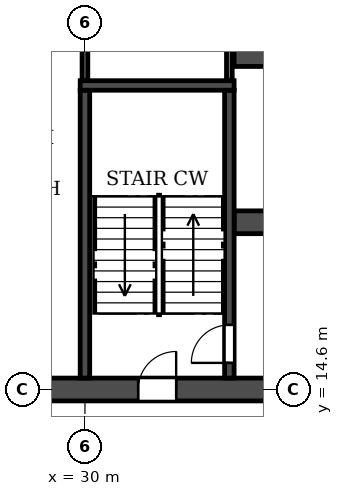
"""IFC4 building model, lengths in metres.
Left out: names, types, materials, properties, quantities, classifications, styles, units other than length and angle.
Written with IfcOpenShell. Run it as: python <this file> out.ifc"""

import sys

from ifc_helpers import new_model, si_unit, direction, frame, frame_2d, origin, place, context, subcontext, project, spatial, rectangle, extrude, element, fill, save


model = new_model("IFC4")
c1 = context("Model", 3, precision=1e-05, world=origin(), true_north=direction((0.0, 1.0)))
c2 = subcontext(c1, "Body", "Model", "MODEL_VIEW")
j1 = project(units=[si_unit("LENGTHUNIT", "METRE"), si_unit("PLANEANGLEUNIT", "RADIAN")], contexts=[c1])
p1 = place(None, origin())
s1 = spatial("IfcSite", under=j1, at=p1, CompositionType="ELEMENT")
p2 = place(p1, origin())
s2 = spatial("IfcBuilding", under=s1, at=p2, CompositionType="ELEMENT")
p3 = place(p2, frame((0.0, 0.0, 63.0)))
s3 = spatial("IfcBuildingStorey", under=s2, at=p3, CompositionType="ELEMENT", Elevation=63.0)
p4 = place(p3, frame((8.6, 14.6, 0.0), z_axis=(0.0, 0.0, 1.0), x_axis=(1.0, 0.0, 0.0)))
e1 = element("IfcWall", 1, at=p4, inside=s3, PredefinedType="SOLIDWALL", context=c2, shape_type="SweptSolid", body=[
    extrude(rectangle(XDim=84.8, YDim=0.6, at=frame_2d((42.4, 0.0))), origin(), (0.0, 0.0, 1.0), 2.95),
])
p5 = place(p4, frame((1.35, 0.0, 0.0)))
e2 = element("IfcOpeningElement", 2, at=p5, cuts=e1, PredefinedType="OPENING", context=c2, shape_type="SweptSolid", body=[
    extrude(rectangle(XDim=1.0, YDim=2.1, at=frame_2d((0.5, 1.05))), frame((0.0, 0.31, 0.0), z_axis=(0.0, -1.0, 0.0), x_axis=(1.0, 0.0, 0.0)), (0.0, 0.0, 1.0), 0.62),
])
p6 = place(p4, frame((6.05, 0.0, 0.0)))
e3 = element("IfcOpeningElement", 3, at=p6, cuts=e1, PredefinedType="OPENING", context=c2, shape_type="SweptSolid", body=[
    extrude(rectangle(XDim=1.0, YDim=2.1, at=frame_2d((0.5, 1.05))), frame((0.0, 0.31, 0.0), z_axis=(0.0, -1.0, 0.0), x_axis=(1.0, 0.0, 0.0)), (0.0, 0.0, 1.0), 0.62),
])
p7 = place(p4, frame((10.3, 0.0, 0.0)))
e4 = element("IfcOpeningElement", 4, at=p7, cuts=e1, PredefinedType="OPENING", context=c2, shape_type="SweptSolid", body=[
    extrude(rectangle(XDim=1.0, YDim=2.1, at=frame_2d((0.5, 1.05))), frame((0.0, 0.31, 0.0), z_axis=(0.0, -1.0, 0.0), x_axis=(1.0, 0.0, 0.0)), (0.0, 0.0, 1.0), 0.62),
])
p8 = place(p4, frame((18.2, 0.0, 0.0)))
e5 = element("IfcOpeningElement", 5, at=p8, cuts=e1, PredefinedType="OPENING", context=c2, shape_type="SweptSolid", body=[
    extrude(rectangle(XDim=1.0, YDim=2.1, at=frame_2d((0.5, 1.05))), frame((0.0, 0.31, 0.0), z_axis=(0.0, -1.0, 0.0), x_axis=(1.0, 0.0, 0.0)), (0.0, 0.0, 1.0), 0.62),
])
p9 = place(p4, frame((22.8, 0.0, 0.0)))
e6 = element("IfcOpeningElement", 6, at=p9, cuts=e1, PredefinedType="OPENING", context=c2, shape_type="SweptSolid", body=[
    extrude(rectangle(XDim=1.0, YDim=2.1, at=frame_2d((0.5, 1.05))), frame((0.0, 0.31, 0.0), z_axis=(0.0, -1.0, 0.0), x_axis=(1.0, 0.0, 0.0)), (0.0, 0.0, 1.0), 0.62),
])
p10 = place(p4, frame((35.4, 0.0, 0.0)))
e7 = element("IfcOpeningElement", 7, at=p10, cuts=e1, PredefinedType="OPENING", context=c2, shape_type="SweptSolid", body=[
    extrude(rectangle(XDim=1.0, YDim=2.1, at=frame_2d((0.5, 1.05))), frame((0.0, 0.31, 0.0), z_axis=(0.0, -1.0, 0.0), x_axis=(1.0, 0.0, 0.0)), (0.0, 0.0, 1.0), 0.62),
])
p11 = place(p4, frame((39.3, 0.0, 0.0)))
e8 = element("IfcOpeningElement", 8, at=p11, cuts=e1, PredefinedType="OPENING", context=c2, shape_type="SweptSolid", body=[
    extrude(rectangle(XDim=1.0, YDim=2.1, at=frame_2d((0.5, 1.05))), frame((0.0, 0.31, 0.0), z_axis=(0.0, -1.0, 0.0), x_axis=(1.0, 0.0, 0.0)), (0.0, 0.0, 1.0), 0.62),
])
p12 = place(p4, frame((41.9, 0.0, 0.0)))
e9 = element("IfcOpeningElement", 9, at=p12, cuts=e1, PredefinedType="OPENING", context=c2, shape_type="SweptSolid", body=[
    extrude(rectangle(XDim=1.0, YDim=2.1, at=frame_2d((0.5, 1.05))), frame((0.0, 0.31, 0.0), z_axis=(0.0, -1.0, 0.0), x_axis=(1.0, 0.0, 0.0)), (0.0, 0.0, 1.0), 0.62),
])
p13 = place(p4, frame((47.1, 0.0, 0.0)))
e10 = element("IfcOpeningElement", 10, at=p13, cuts=e1, PredefinedType="OPENING", context=c2, shape_type="SweptSolid", body=[
    extrude(rectangle(XDim=1.0, YDim=2.1, at=frame_2d((0.5, 1.05))), frame((0.0, 0.31, 0.0), z_axis=(0.0, -1.0, 0.0), x_axis=(1.0, 0.0, 0.0)), (0.0, 0.0, 1.0), 0.62),
])
p14 = place(p4, frame((61.0, 0.0, 0.0)))
e11 = element("IfcOpeningElement", 11, at=p14, cuts=e1, PredefinedType="OPENING", context=c2, shape_type="SweptSolid", body=[
    extrude(rectangle(XDim=1.0, YDim=2.1, at=frame_2d((0.5, 1.05))), frame((0.0, 0.31, 0.0), z_axis=(0.0, -1.0, 0.0), x_axis=(1.0, 0.0, 0.0)), (0.0, 0.0, 1.0), 0.62),
])
p15 = place(p4, frame((65.6, 0.0, 0.0)))
e12 = element("IfcOpeningElement", 12, at=p15, cuts=e1, PredefinedType="OPENING", context=c2, shape_type="SweptSolid", body=[
    extrude(rectangle(XDim=1.0, YDim=2.1, at=frame_2d((0.5, 1.05))), frame((0.0, 0.31, 0.0), z_axis=(0.0, -1.0, 0.0), x_axis=(1.0, 0.0, 0.0)), (0.0, 0.0, 1.0), 0.62),
])
p16 = place(p4, frame((73.5, 0.0, 0.0)))
e13 = element("IfcOpeningElement", 13, at=p16, cuts=e1, PredefinedType="OPENING", context=c2, shape_type="SweptSolid", body=[
    extrude(rectangle(XDim=1.0, YDim=2.1, at=frame_2d((0.5, 1.05))), frame((0.0, 0.31, 0.0), z_axis=(0.0, -1.0, 0.0), x_axis=(1.0, 0.0, 0.0)), (0.0, 0.0, 1.0), 0.62),
])
p17 = place(p4, frame((77.9, 0.0, 0.0)))
e14 = element("IfcOpeningElement", 14, at=p17, cuts=e1, PredefinedType="OPENING", context=c2, shape_type="SweptSolid", body=[
    extrude(rectangle(XDim=1.0, YDim=2.1, at=frame_2d((0.5, 1.05))), frame((0.0, 0.31, 0.0), z_axis=(0.0, -1.0, 0.0), x_axis=(1.0, 0.0, 0.0)), (0.0, 0.0, 1.0), 0.62),
])
p18 = place(p4, frame((82.6, 0.0, 0.0)))
e15 = element("IfcOpeningElement", 15, at=p18, cuts=e1, PredefinedType="OPENING", context=c2, shape_type="SweptSolid", body=[
    extrude(rectangle(XDim=1.0, YDim=2.1, at=frame_2d((0.5, 1.05))), frame((0.0, 0.31, 0.0), z_axis=(0.0, -1.0, 0.0), x_axis=(1.0, 0.0, 0.0)), (0.0, 0.0, 1.0), 0.62),
])
p19 = place(p3, frame((33.925, 19.0, 0.0), z_axis=(0.0, 0.0, 1.0), x_axis=(1.0, 0.0, 0.0)))
e16 = element("IfcWall", 16, at=p19, inside=s3, PredefinedType="SOLIDWALL", context=c2, shape_type="SweptSolid", body=[
    extrude(rectangle(XDim=34.15, YDim=0.6, at=frame_2d((17.075, 0.0))), origin(), (0.0, 0.0, 1.0), 2.95),
])
p20 = place(p19, frame((16.175, 0.0, 0.0)))
e17 = element("IfcOpeningElement", 17, at=p20, cuts=e16, PredefinedType="OPENING", context=c2, shape_type="SweptSolid", body=[
    extrude(rectangle(XDim=1.8, YDim=2.1, at=frame_2d((0.9, 1.05))), frame((0.0, 0.31, 0.0), z_axis=(0.0, -1.0, 0.0), x_axis=(1.0, 0.0, 0.0)), (0.0, 0.0, 1.0), 0.62),
])
p21 = place(p19, frame((1.525, 0.0, 0.0)))
e18 = element("IfcOpeningElement", 18, at=p21, cuts=e16, PredefinedType="OPENING", context=c2, shape_type="SweptSolid", body=[
    extrude(rectangle(XDim=1.8, YDim=2.1, at=frame_2d((0.9, 1.05))), frame((0.0, 0.31, 0.0), z_axis=(0.0, -1.0, 0.0), x_axis=(1.0, 0.0, 0.0)), (0.0, 0.0, 1.0), 0.62),
])
p22 = place(p19, frame((8.725, 0.0, 0.0)))
e19 = element("IfcOpeningElement", 19, at=p22, cuts=e16, PredefinedType="OPENING", context=c2, shape_type="SweptSolid", body=[
    extrude(rectangle(XDim=1.1, YDim=2.1, at=frame_2d((0.55, 1.05))), frame((0.0, 0.31, 0.0), z_axis=(0.0, -1.0, 0.0), x_axis=(1.0, 0.0, 0.0)), (0.0, 0.0, 1.0), 0.62),
])
p23 = place(p19, frame((11.325, 0.0, 0.0)))
e20 = element("IfcOpeningElement", 20, at=p23, cuts=e16, PredefinedType="OPENING", context=c2, shape_type="SweptSolid", body=[
    extrude(rectangle(XDim=1.1, YDim=2.1, at=frame_2d((0.55, 1.05))), frame((0.0, 0.31, 0.0), z_axis=(0.0, -1.0, 0.0), x_axis=(1.0, 0.0, 0.0)), (0.0, 0.0, 1.0), 0.62),
])
p24 = place(p19, frame((13.925, 0.0, 0.0)))
e21 = element("IfcOpeningElement", 21, at=p24, cuts=e16, PredefinedType="OPENING", context=c2, shape_type="SweptSolid", body=[
    extrude(rectangle(XDim=1.1, YDim=2.1, at=frame_2d((0.55, 1.05))), frame((0.0, 0.31, 0.0), z_axis=(0.0, -1.0, 0.0), x_axis=(1.0, 0.0, 0.0)), (0.0, 0.0, 1.0), 0.62),
])
p25 = place(p19, frame((19.125, 0.0, 0.0)))
e22 = element("IfcOpeningElement", 22, at=p25, cuts=e16, PredefinedType="OPENING", context=c2, shape_type="SweptSolid", body=[
    extrude(rectangle(XDim=1.1, YDim=2.1, at=frame_2d((0.55, 1.05))), frame((0.0, 0.31, 0.0), z_axis=(0.0, -1.0, 0.0), x_axis=(1.0, 0.0, 0.0)), (0.0, 0.0, 1.0), 0.62),
])
p26 = place(p19, frame((21.725, 0.0, 0.0)))
e23 = element("IfcOpeningElement", 23, at=p26, cuts=e16, PredefinedType="OPENING", context=c2, shape_type="SweptSolid", body=[
    extrude(rectangle(XDim=1.1, YDim=2.1, at=frame_2d((0.55, 1.05))), frame((0.0, 0.31, 0.0), z_axis=(0.0, -1.0, 0.0), x_axis=(1.0, 0.0, 0.0)), (0.0, 0.0, 1.0), 0.62),
])
p27 = place(p19, frame((24.325, 0.0, 0.0)))
e24 = element("IfcOpeningElement", 24, at=p27, cuts=e16, PredefinedType="OPENING", context=c2, shape_type="SweptSolid", body=[
    extrude(rectangle(XDim=1.1, YDim=2.1, at=frame_2d((0.55, 1.05))), frame((0.0, 0.31, 0.0), z_axis=(0.0, -1.0, 0.0), x_axis=(1.0, 0.0, 0.0)), (0.0, 0.0, 1.0), 0.62),
])
p28 = place(p19, frame((30.825, 0.0, 0.0)))
e25 = element("IfcOpeningElement", 25, at=p28, cuts=e16, PredefinedType="OPENING", context=c2, shape_type="SweptSolid", body=[
    extrude(rectangle(XDim=1.8, YDim=2.1, at=frame_2d((0.9, 1.05))), frame((0.0, 0.31, 0.0), z_axis=(0.0, -1.0, 0.0), x_axis=(1.0, 0.0, 0.0)), (0.0, 0.0, 1.0), 0.62),
])
p29 = place(p3, frame((33.925, 23.4, 0.0), z_axis=(0.0, 0.0, 1.0), x_axis=(1.0, 0.0, 0.0)))
e26 = element("IfcWall", 26, at=p29, inside=s3, PredefinedType="SOLIDWALL", context=c2, shape_type="SweptSolid", body=[
    extrude(rectangle(XDim=34.15, YDim=0.6, at=frame_2d((17.075, 0.0))), origin(), (0.0, 0.0, 1.0), 2.95),
])
p30 = place(p29, frame((16.175, 0.0, 0.0)))
e27 = element("IfcOpeningElement", 27, at=p30, cuts=e26, PredefinedType="OPENING", context=c2, shape_type="SweptSolid", body=[
    extrude(rectangle(XDim=1.8, YDim=2.1, at=frame_2d((0.9, 1.05))), frame((0.0, 0.31, 0.0), z_axis=(0.0, -1.0, 0.0), x_axis=(1.0, 0.0, 0.0)), (0.0, 0.0, 1.0), 0.62),
])
p31 = place(p29, frame((11.025, 0.0, 0.0)))
e28 = element("IfcOpeningElement", 28, at=p31, cuts=e26, PredefinedType="OPENING", context=c2, shape_type="SweptSolid", body=[
    extrude(rectangle(XDim=1.1, YDim=2.1, at=frame_2d((0.55, 1.05))), frame((0.0, 0.31, 0.0), z_axis=(0.0, -1.0, 0.0), x_axis=(1.0, 0.0, 0.0)), (0.0, 0.0, 1.0), 0.62),
])
p32 = place(p3, frame((30.0, 14.9, 0.0), z_axis=(0.0, 0.0, 1.0), x_axis=(0.0, 1.0, 0.0)))
e29 = element("IfcWall", 29, at=p32, inside=s3, PredefinedType="SOLIDWALL", context=c2, shape_type="SweptSolid", body=[
    extrude(rectangle(XDim=7.575, YDim=0.25, at=frame_2d((3.788, 0.0))), origin(), (0.0, 0.0, 1.0), 2.95),
])
p33 = place(p3, frame((33.8, 14.9, 0.0), z_axis=(0.0, 0.0, 1.0), x_axis=(0.0, 1.0, 0.0)))
e30 = element("IfcWall", 30, at=p33, inside=s3, PredefinedType="SOLIDWALL", context=c2, shape_type="SweptSolid", body=[
    extrude(rectangle(XDim=7.575, YDim=0.25, at=frame_2d((3.788, 0.0))), origin(), (0.0, 0.0, 1.0), 2.95),
])
p34 = place(p33, frame((0.4, 0.0, 0.0)))
e31 = element("IfcOpeningElement", 31, at=p34, cuts=e30, PredefinedType="OPENING", context=c2, shape_type="SweptSolid", body=[
    extrude(rectangle(XDim=1.0, YDim=2.1, at=frame_2d((0.5, 1.05))), frame((0.0, 0.135, 0.0), z_axis=(0.0, -1.0, 0.0), x_axis=(1.0, 0.0, 0.0)), (0.0, 0.0, 1.0), 0.27),
])
p35 = place(p3, frame((29.875, 22.6, 0.0), z_axis=(0.0, 0.0, 1.0), x_axis=(1.0, 0.0, 0.0)))
e32 = element("IfcWall", 32, at=p35, inside=s3, PredefinedType="SOLIDWALL", context=c2, shape_type="SweptSolid", body=[
    extrude(rectangle(XDim=4.05, YDim=0.25, at=frame_2d((2.025, 0.0))), origin(), (0.0, 0.0, 1.0), 2.95),
])
for number, where, z_axis, x_axis in (
    (33, (30.0, 22.735, 0.0), (0.0, 0.0, 1.0), (0.0, 1.0, 0.0)),
    (34, (33.8, 22.735, 0.0), (0.0, 0.0, 1.0), (0.0, 1.0, 0.0)),
):
    element("IfcWall", number, at=place(p3, frame(where, z_axis=z_axis, x_axis=x_axis)), inside=s3, PredefinedType="PARTITIONING", context=c2, shape_type="SweptSolid", body=[
        extrude(rectangle(XDim=4.755, YDim=0.15, at=frame_2d((2.377, 0.0))), origin(), (0.0, 0.0, 1.0), 2.95),
    ])
p36 = place(p9, origin())
e35 = element("IfcDoor", 35, at=p36, inside=s3, OperationType="SINGLE_SWING_RIGHT", PredefinedType="DOOR", context=c2, shape_type="SweptSolid", body=[
    extrude(rectangle(XDim=1.0, YDim=2.1, at=frame_2d((0.5, 1.05))), frame((0.0, 0.025, 0.0), z_axis=(0.0, -1.0, 0.0), x_axis=(1.0, 0.0, 0.0)), (0.0, 0.0, 1.0), 0.05),
])
fill(e6, e35)
p37 = place(p34, origin())
e36 = element("IfcDoor", 36, at=p37, inside=s3, OperationType="SINGLE_SWING_LEFT", PredefinedType="DOOR", context=c2, shape_type="SweptSolid", body=[
    extrude(rectangle(XDim=1.0, YDim=2.1, at=frame_2d((0.5, 1.05))), frame((0.0, 0.025, 0.0), z_axis=(0.0, -1.0, 0.0), x_axis=(1.0, 0.0, 0.0)), (0.0, 0.0, 1.0), 0.05),
])
fill(e31, e36)
save(model, sys.argv[1])
